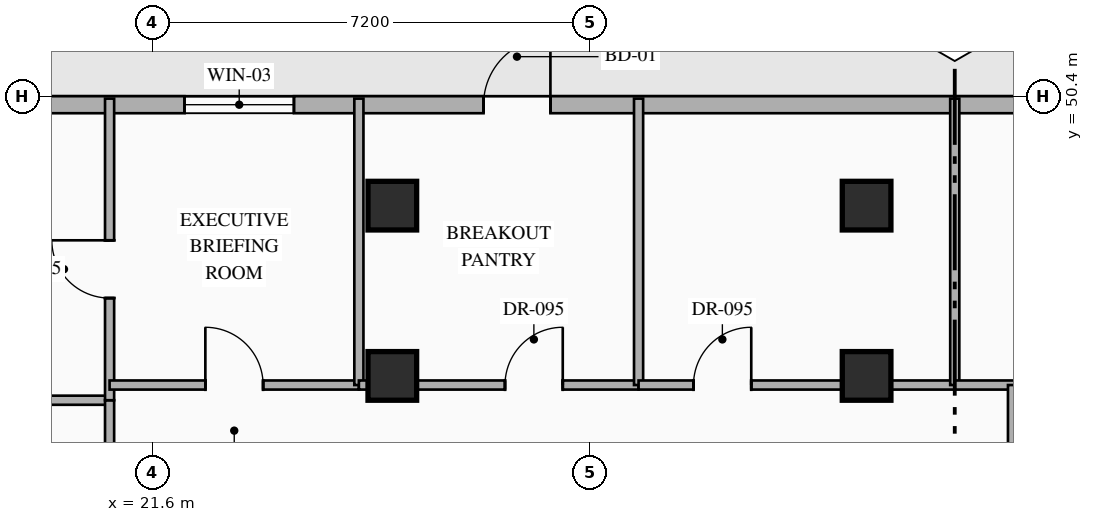
"""IFC4 building model, lengths in metres.
Left out: names, types, materials, properties, quantities, classifications, styles, units other than length and angle.
Written with IfcOpenShell. Run it as: python <this file> out.ifc"""

import sys

from ifc_helpers import new_model, si_unit, direction, frame, frame_2d, origin, origin_2d, place, context, subcontext, project, spatial, rectangle, hollow_rectangle, extrude, element, fill, save


model = new_model("IFC4")
c1 = context("Model", 3, precision=1e-05, world=origin(), true_north=direction((0.0, 1.0)))
c2 = subcontext(c1, "Body", "Model", "MODEL_VIEW")
j1 = project(units=[si_unit("LENGTHUNIT", "METRE"), si_unit("PLANEANGLEUNIT", "RADIAN")], contexts=[c1])
p1 = place(None, origin())
s1 = spatial("IfcSite", under=j1, at=p1, CompositionType="ELEMENT")
p2 = place(p1, origin())
s2 = spatial("IfcBuilding", under=s1, at=p2, CompositionType="ELEMENT")
p3 = place(p2, frame((0.0, 0.0, 167.25)))
s3 = spatial("IfcBuildingStorey", under=s2, at=p3, CompositionType="ELEMENT", Elevation=167.25)
for number, where, z_axis, x_axis in (
    (1, (25.55, 45.8, 0.0), (0.0, 0.0, 1.0), (1.0, 0.0, 0.0)),
    (2, (33.35, 45.8, 0.0), (0.0, 0.0, 1.0), (1.0, 0.0, 0.0)),
    (3, (25.55, 48.6, 0.0), (0.0, 0.0, 1.0), (1.0, 0.0, 0.0)),
    (4, (33.35, 48.6, 0.0), (0.0, 0.0, 1.0), (1.0, 0.0, 0.0)),
):
    element("IfcColumn", number, at=place(p3, frame(where, z_axis=z_axis, x_axis=x_axis)), inside=s3, PredefinedType="COLUMN", context=c2, shape_type="SweptSolid", body=[
        extrude(hollow_rectangle(XDim=0.8, YDim=0.8, WallThickness=0.032, at=origin_2d()), origin(), (0.0, 0.0, 1.0), 3.6),
    ])
p4 = place(p3, frame((12.058, 50.26, 0.0), z_axis=(0.0, 0.0, 1.0), x_axis=(1.0, 0.0, 0.0)))
e5 = element("IfcWall", 5, at=p4, inside=s3, PredefinedType="STANDARD", context=c2, shape_type="SweptSolid", body=[
    extrude(rectangle(XDim=30.484, YDim=0.28, at=frame_2d((15.242, 0.0))), origin(), (0.0, 0.0, 1.0), 3.35),
])
p5 = place(p4, frame((14.992, 0.0, 0.0)))
e6 = element("IfcOpeningElement", 6, at=p5, cuts=e5, PredefinedType="OPENING", context=c2, shape_type="SweptSolid", body=[
    extrude(rectangle(XDim=1.1, YDim=2.2, at=frame_2d((0.55, 1.1))), frame((0.0, 0.15, 0.0), z_axis=(0.0, -1.0, 0.0), x_axis=(1.0, 0.0, 0.0)), (0.0, 0.0, 1.0), 0.3),
])
p6 = place(p4, frame((10.074, 0.0, 0.85)))
e7 = element("IfcOpeningElement", 7, at=p6, cuts=e5, PredefinedType="OPENING", context=c2, shape_type="SweptSolid", body=[
    extrude(rectangle(XDim=1.8, YDim=2.1, at=frame_2d((0.9, 1.05))), frame((0.0, 0.15, 0.0), z_axis=(0.0, -1.0, 0.0), x_axis=(1.0, 0.0, 0.0)), (0.0, 0.0, 1.0), 0.3),
])
p7 = place(p3, frame((9.64, 45.4, 0.0), z_axis=(0.0, 0.0, 1.0), x_axis=(1.0, 0.0, 0.0)))
e8 = element("IfcWall", 8, at=p7, inside=s3, PredefinedType="PARTITIONING", context=c2, shape_type="SweptSolid", body=[
    extrude(rectangle(XDim=11.26, YDim=0.15, at=frame_2d((5.63, 0.0))), origin(), (0.0, 0.0, 1.0), 3.35),
])
p8 = place(p3, frame((20.9, 40.2, 0.0), z_axis=(0.0, 0.0, 1.0), x_axis=(0.0, 1.0, 0.0)))
e9 = element("IfcWall", 9, at=p8, inside=s3, PredefinedType="PARTITIONING", context=c2, shape_type="SweptSolid", body=[
    extrude(rectangle(XDim=5.2, YDim=0.15, at=frame_2d((2.6, 0.0))), origin(), (0.0, 0.0, 1.0), 3.35),
])
p9 = place(p8, frame((2.474, 0.0, 0.0)))
e10 = element("IfcOpeningElement", 10, at=p9, cuts=e9, PredefinedType="OPENING", context=c2, shape_type="SweptSolid", body=[
    extrude(rectangle(XDim=0.95, YDim=2.15, at=frame_2d((0.475, 1.075))), frame((0.0, 0.085, 0.0), z_axis=(0.0, -1.0, 0.0), x_axis=(1.0, 0.0, 0.0)), (0.0, 0.0, 1.0), 0.17),
])
p10 = place(p3, frame((20.9, 45.4, 0.0), z_axis=(0.0, 0.0, 1.0), x_axis=(0.0, 1.0, 0.0)))
e11 = element("IfcWall", 11, at=p10, inside=s3, PredefinedType="PARTITIONING", context=c2, shape_type="SweptSolid", body=[
    extrude(rectangle(XDim=4.96, YDim=0.15, at=frame_2d((2.48, 0.0))), origin(), (0.0, 0.0, 1.0), 3.35),
])
p11 = place(p10, frame((1.68, 0.0, 0.0)))
e12 = element("IfcOpeningElement", 12, at=p11, cuts=e11, PredefinedType="OPENING", context=c2, shape_type="SweptSolid", body=[
    extrude(rectangle(XDim=0.95, YDim=2.15, at=frame_2d((0.475, 1.075))), frame((0.0, 0.085, 0.0), z_axis=(0.0, -1.0, 0.0), x_axis=(1.0, 0.0, 0.0)), (0.0, 0.0, 1.0), 0.17),
])
p12 = place(p3, frame((20.9, 45.65, 0.0), z_axis=(0.0, 0.0, 1.0), x_axis=(1.0, 0.0, 0.0)))
e13 = element("IfcWall", 13, at=p12, inside=s3, PredefinedType="PARTITIONING", context=c2, shape_type="SweptSolid", body=[
    extrude(rectangle(XDim=4.1, YDim=0.15, at=frame_2d((2.05, 0.0))), origin(), (0.0, 0.0, 1.0), 3.35),
])
p13 = place(p12, frame((1.575, 0.0, 0.0)))
e14 = element("IfcOpeningElement", 14, at=p13, cuts=e13, PredefinedType="OPENING", context=c2, shape_type="SweptSolid", body=[
    extrude(rectangle(XDim=0.95, YDim=2.15, at=frame_2d((0.475, 1.075))), frame((0.0, 0.085, 0.0), z_axis=(0.0, -1.0, 0.0), x_axis=(1.0, 0.0, 0.0)), (0.0, 0.0, 1.0), 0.17),
])
p14 = place(p3, frame((25.0, 45.65, 0.0), z_axis=(0.0, 0.0, 1.0), x_axis=(0.0, 1.0, 0.0)))
e15 = element("IfcWall", 15, at=p14, inside=s3, PredefinedType="PARTITIONING", context=c2, shape_type="SweptSolid", body=[
    extrude(rectangle(XDim=4.71, YDim=0.15, at=frame_2d((2.355, 0.0))), origin(), (0.0, 0.0, 1.0), 3.35),
])
p15 = place(p3, frame((25.0, 45.65, 0.0), z_axis=(0.0, 0.0, 1.0), x_axis=(1.0, 0.0, 0.0)))
e16 = element("IfcWall", 16, at=p15, inside=s3, PredefinedType="PARTITIONING", context=c2, shape_type="SweptSolid", body=[
    extrude(rectangle(XDim=4.6, YDim=0.15, at=frame_2d((2.3, 0.0))), origin(), (0.0, 0.0, 1.0), 2.695),
])
p16 = place(p15, frame((2.403, 0.0, 0.0)))
e17 = element("IfcOpeningElement", 17, at=p16, cuts=e16, PredefinedType="OPENING", context=c2, shape_type="SweptSolid", body=[
    extrude(rectangle(XDim=0.95, YDim=2.15, at=frame_2d((0.475, 1.075))), frame((0.0, 0.085, 0.0), z_axis=(0.0, -1.0, 0.0), x_axis=(1.0, 0.0, 0.0)), (0.0, 0.0, 1.0), 0.17),
])
p17 = place(p3, frame((29.6, 45.65, 0.0), z_axis=(0.0, 0.0, 1.0), x_axis=(0.0, 1.0, 0.0)))
e18 = element("IfcWall", 18, at=p17, inside=s3, PredefinedType="PARTITIONING", context=c2, shape_type="SweptSolid", body=[
    extrude(rectangle(XDim=4.71, YDim=0.15, at=frame_2d((2.355, 0.0))), origin(), (0.0, 0.0, 1.0), 3.35),
])
p18 = place(p3, frame((29.6, 45.65, 0.0), z_axis=(0.0, 0.0, 1.0), x_axis=(1.0, 0.0, 0.0)))
e19 = element("IfcWall", 19, at=p18, inside=s3, PredefinedType="PARTITIONING", context=c2, shape_type="SweptSolid", body=[
    extrude(rectangle(XDim=5.2, YDim=0.15, at=frame_2d((2.6, 0.0))), origin(), (0.0, 0.0, 1.0), 2.695),
])
p19 = place(p18, frame((0.903, 0.0, 0.0)))
e20 = element("IfcOpeningElement", 20, at=p19, cuts=e19, PredefinedType="OPENING", context=c2, shape_type="SweptSolid", body=[
    extrude(rectangle(XDim=0.95, YDim=2.15, at=frame_2d((0.475, 1.075))), frame((0.0, 0.085, 0.0), z_axis=(0.0, -1.0, 0.0), x_axis=(1.0, 0.0, 0.0)), (0.0, 0.0, 1.0), 0.17),
])
p20 = place(p3, frame((34.8, 45.65, 0.0), z_axis=(0.0, 0.0, 1.0), x_axis=(0.0, 1.0, 0.0)))
e21 = element("IfcWall", 21, at=p20, inside=s3, PredefinedType="PARTITIONING", context=c2, shape_type="SweptSolid", body=[
    extrude(rectangle(XDim=4.71, YDim=0.15, at=frame_2d((2.355, 0.0))), origin(), (0.0, 0.0, 1.0), 3.35),
])
p21 = place(p3, frame((34.8, 45.65, 0.0), z_axis=(0.0, 0.0, 1.0), x_axis=(1.0, 0.0, 0.0)))
e22 = element("IfcWall", 22, at=p21, inside=s3, PredefinedType="PARTITIONING", context=c2, shape_type="SweptSolid", body=[
    extrude(rectangle(XDim=5.2, YDim=0.15, at=frame_2d((2.6, 0.0))), origin(), (0.0, 0.0, 1.0), 2.695),
])
p22 = place(p21, frame((2.125, 0.0, 0.0)))
e23 = element("IfcOpeningElement", 23, at=p22, cuts=e22, PredefinedType="OPENING", context=c2, shape_type="SweptSolid", body=[
    extrude(rectangle(XDim=0.95, YDim=2.15, at=frame_2d((0.475, 1.075))), frame((0.0, 0.085, 0.0), z_axis=(0.0, -1.0, 0.0), x_axis=(1.0, 0.0, 0.0)), (0.0, 0.0, 1.0), 0.17),
])
p23 = place(p3, frame((35.75, 42.55, 0.0), z_axis=(0.0, 0.0, 1.0), x_axis=(0.0, 1.0, 0.0)))
e24 = element("IfcWall", 24, at=p23, inside=s3, PredefinedType="PARTITIONING", context=c2, shape_type="SweptSolid", body=[
    extrude(rectangle(XDim=3.1, YDim=0.15, at=frame_2d((1.55, 0.0))), origin(), (0.0, 0.0, 1.0), 3.35),
])
p24 = place(p23, frame((1.075, 0.0, 0.0)))
e25 = element("IfcOpeningElement", 25, at=p24, cuts=e24, PredefinedType="OPENING", context=c2, shape_type="SweptSolid", body=[
    extrude(rectangle(XDim=0.95, YDim=2.15, at=frame_2d((0.475, 1.075))), frame((0.0, 0.085, 0.0), z_axis=(0.0, -1.0, 0.0), x_axis=(1.0, 0.0, 0.0)), (0.0, 0.0, 1.0), 0.17),
])
p25 = place(p5, origin())
e26 = element("IfcDoor", 26, at=p25, inside=s3, OperationType="SINGLE_SWING_RIGHT", PredefinedType="DOOR", context=c2, shape_type="SweptSolid", body=[
    extrude(rectangle(XDim=1.1, YDim=2.2, at=frame_2d((0.55, 1.1))), frame((0.0, 0.025, 0.0), z_axis=(0.0, -1.0, 0.0), x_axis=(1.0, 0.0, 0.0)), (0.0, 0.0, 1.0), 0.05),
])
fill(e6, e26)
p26 = place(p6, origin())
e27 = element("IfcWindow", 27, at=p26, inside=s3, PartitioningType="SINGLE_PANEL", PredefinedType="WINDOW", context=c2, shape_type="SweptSolid", body=[
    extrude(rectangle(XDim=1.8, YDim=2.1, at=frame_2d((0.9, 1.05))), frame((0.0, 0.03, 0.0), z_axis=(0.0, -1.0, 0.0), x_axis=(1.0, 0.0, 0.0)), (0.0, 0.0, 1.0), 0.06),
])
fill(e7, e27)
p27 = place(p11, origin())
e28 = element("IfcDoor", 28, at=p27, inside=s3, OperationType="SINGLE_SWING_RIGHT", PredefinedType="DOOR", context=c2, shape_type="SweptSolid", body=[
    extrude(rectangle(XDim=0.95, YDim=2.15, at=frame_2d((0.475, 1.075))), frame((0.0, 0.025, 0.0), z_axis=(0.0, -1.0, 0.0), x_axis=(1.0, 0.0, 0.0)), (0.0, 0.0, 1.0), 0.05),
])
fill(e12, e28)
p28 = place(p13, origin())
e29 = element("IfcDoor", 29, at=p28, inside=s3, OperationType="SINGLE_SWING_LEFT", PredefinedType="DOOR", context=c2, shape_type="SweptSolid", body=[
    extrude(rectangle(XDim=0.95, YDim=2.15, at=frame_2d((0.475, 1.075))), frame((0.0, 0.025, 0.0), z_axis=(0.0, -1.0, 0.0), x_axis=(1.0, 0.0, 0.0)), (0.0, 0.0, 1.0), 0.05),
])
fill(e14, e29)
p29 = place(p16, origin())
e30 = element("IfcDoor", 30, at=p29, inside=s3, OperationType="SINGLE_SWING_RIGHT", PredefinedType="DOOR", context=c2, shape_type="SweptSolid", body=[
    extrude(rectangle(XDim=0.95, YDim=2.15, at=frame_2d((0.475, 1.075))), frame((0.0, 0.025, 0.0), z_axis=(0.0, -1.0, 0.0), x_axis=(1.0, 0.0, 0.0)), (0.0, 0.0, 1.0), 0.05),
])
fill(e17, e30)
p30 = place(p19, origin())
e31 = element("IfcDoor", 31, at=p30, inside=s3, OperationType="SINGLE_SWING_RIGHT", PredefinedType="DOOR", context=c2, shape_type="SweptSolid", body=[
    extrude(rectangle(XDim=0.95, YDim=2.15, at=frame_2d((0.475, 1.075))), frame((0.0, 0.025, 0.0), z_axis=(0.0, -1.0, 0.0), x_axis=(1.0, 0.0, 0.0)), (0.0, 0.0, 1.0), 0.05),
])
fill(e20, e31)
save(model, sys.argv[1])
